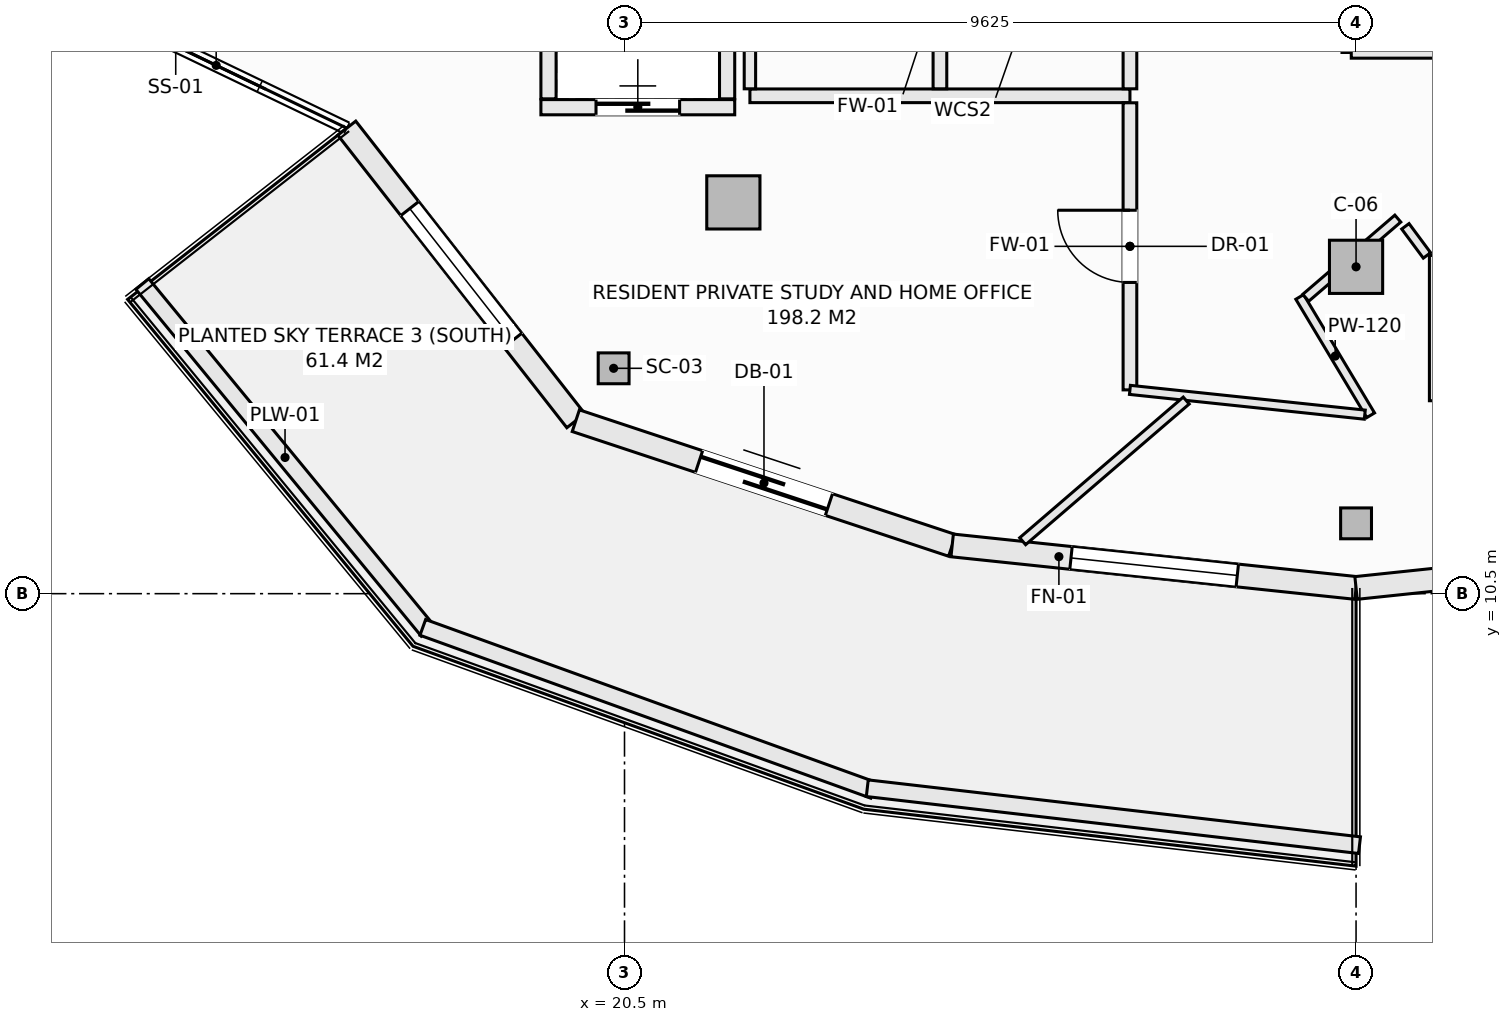
"""IFC4 building model, lengths in metres.
Left out: names, types, materials, properties, quantities, classifications, styles, units other than length and angle.
Written with IfcOpenShell. Run it as: python <this file> out.ifc"""

import sys

from ifc_helpers import new_model, si_unit, direction, frame, frame_2d, origin, origin_2d, place, context, subcontext, project, spatial, rectangle, hollow_rectangle, extrude, element, fill, save


model = new_model("IFC4")
c1 = context("Model", 3, precision=1e-05, world=origin(), true_north=direction((0.0, 1.0)))
c2 = subcontext(c1, "Body", "Model", "MODEL_VIEW")
j1 = project(units=[si_unit("LENGTHUNIT", "METRE"), si_unit("PLANEANGLEUNIT", "RADIAN")], contexts=[c1])
p1 = place(None, origin())
s1 = spatial("IfcSite", under=j1, at=p1, CompositionType="ELEMENT")
p2 = place(p1, origin())
s2 = spatial("IfcBuilding", under=s1, at=p2, CompositionType="ELEMENT")
p3 = place(p2, frame((0.0, 0.0, 259.1)))
s3 = spatial("IfcBuildingStorey", under=s2, at=p3, CompositionType="ELEMENT", Elevation=259.1)
for number, where, z_axis, x_axis in (
    (1, (20.357, 13.465, -0.27), (0.0, 0.0, 1.0), (1.0, 0.0, 0.0)),
    (2, (30.125, 11.425, -0.27), (0.0, 0.0, 1.0), (1.0, 0.0, 0.0)),
):
    element("IfcColumn", number, at=place(p3, frame(where, z_axis=z_axis, x_axis=x_axis)), inside=s3, PredefinedType="COLUMN", context=c2, shape_type="SweptSolid", body=[
        extrude(hollow_rectangle(XDim=0.406, YDim=0.406, WallThickness=0.016, at=origin_2d()), origin(), (0.0, 0.0, 1.0), 3.3),
    ])
for number, where, z_axis, x_axis in (
    (3, (21.932, 15.648, -0.27), (0.0, 0.0, 1.0), (1.0, 0.0, 0.0)),
    (4, (30.125, 14.8, -0.27), (0.0, 0.0, 1.0), (1.0, 0.0, 0.0)),
):
    element("IfcColumn", number, at=place(p3, frame(where, z_axis=z_axis, x_axis=x_axis)), inside=s3, PredefinedType="COLUMN", context=c2, shape_type="SweptSolid", body=[
        extrude(rectangle(XDim=0.7, YDim=0.7, at=origin_2d()), origin(), (0.0, 0.0, 1.0), 3.3),
    ])
p4 = place(p3, frame((16.846, 16.625, 0.0), z_axis=(0.0, 0.0, 1.0), x_axis=(0.616413297421, -0.78742278781, 0.0)))
e5 = element("IfcWall", 5, at=p4, inside=s3, PredefinedType="SOLIDWALL", context=c2, shape_type="SweptSolid", body=[
    extrude(rectangle(XDim=4.888, YDim=0.3, at=frame_2d((2.444, 0.0))), origin(), (0.0, 0.0, 1.0), 2.605),
])
p5 = place(p4, frame((1.344, 0.0, 0.72)))
e6 = element("IfcOpeningElement", 6, at=p5, cuts=e5, PredefinedType="OPENING", context=c2, shape_type="SweptSolid", body=[
    extrude(rectangle(XDim=2.2, YDim=1.65, at=frame_2d((1.1, 0.825))), frame((0.0, 0.16, 0.0), z_axis=(0.0, -1.0, 0.0), x_axis=(1.0, 0.0, 0.0)), (0.0, 0.0, 1.0), 0.32),
])
p6 = place(p3, frame((19.859, 12.775, 0.0), z_axis=(0.0, 0.0, 1.0), x_axis=(0.949252744709, -0.314514271001, 0.0)))
e7 = element("IfcWall", 7, at=p6, inside=s3, PredefinedType="SOLIDWALL", context=c2, shape_type="SweptSolid", body=[
    extrude(rectangle(XDim=5.216, YDim=0.3, at=frame_2d((2.608, 0.0))), origin(), (0.0, 0.0, 1.0), 2.605),
])
p7 = place(p6, frame((1.708, 0.0, 0.0)))
e8 = element("IfcOpeningElement", 8, at=p7, cuts=e7, PredefinedType="OPENING", context=c2, shape_type="SweptSolid", body=[
    extrude(rectangle(XDim=1.8, YDim=2.25, at=frame_2d((0.9, 1.125))), frame((0.0, 0.16, 0.0), z_axis=(0.0, -1.0, 0.0), x_axis=(1.0, 0.0, 0.0)), (0.0, 0.0, 1.0), 0.32),
])
p8 = place(p3, frame((24.811, 11.135, 0.0), z_axis=(0.0, 0.0, 1.0), x_axis=(0.9944966869, -0.104768028258, 0.0)))
e9 = element("IfcWall", 9, at=p8, inside=s3, PredefinedType="SOLIDWALL", context=c2, shape_type="SweptSolid", body=[
    extrude(rectangle(XDim=5.343, YDim=0.3, at=frame_2d((2.672, 0.0))), origin(), (0.0, 0.0, 1.0), 2.605),
])
p9 = place(p8, frame((1.572, 0.0, 0.72)))
e10 = element("IfcOpeningElement", 10, at=p9, cuts=e9, PredefinedType="OPENING", context=c2, shape_type="SweptSolid", body=[
    extrude(rectangle(XDim=2.2, YDim=1.65, at=frame_2d((1.1, 0.825))), frame((0.0, 0.16, 0.0), z_axis=(0.0, -1.0, 0.0), x_axis=(1.0, 0.0, 0.0)), (0.0, 0.0, 1.0), 0.32),
])
p10 = place(p3, frame((30.125, 10.575, 0.0), z_axis=(0.0, 0.0, 1.0), x_axis=(0.9944966869, 0.104768028258, 0.0)))
e11 = element("IfcWall", 11, at=p10, inside=s3, PredefinedType="SOLIDWALL", context=c2, shape_type="SweptSolid", body=[
    extrude(rectangle(XDim=5.343, YDim=0.3, at=frame_2d((2.672, 0.0))), origin(), (0.0, 0.0, 1.0), 2.605),
])
p11 = place(p10, frame((1.572, 0.0, 0.72)))
e12 = element("IfcOpeningElement", 12, at=p11, cuts=e11, PredefinedType="OPENING", context=c2, shape_type="SweptSolid", body=[
    extrude(rectangle(XDim=2.2, YDim=1.65, at=frame_2d((1.1, 0.825))), frame((0.0, 0.16, 0.0), z_axis=(0.0, -1.0, 0.0), x_axis=(1.0, 0.0, 0.0)), (0.0, 0.0, 1.0), 0.32),
])
p12 = place(p3, frame((14.156, 14.573, 0.0), z_axis=(0.0, 0.0, 1.0), x_axis=(0.635450933862, -0.772141250455, 0.0)))
e13 = element("IfcWall", 13, at=p12, inside=s3, PredefinedType="PARAPET", context=c2, shape_type="SweptSolid", body=[
    extrude(rectangle(XDim=5.91, YDim=0.22, at=frame_2d((2.955, 0.0))), origin(), (0.0, 0.0, 1.0), 0.52),
])
p13 = place(p3, frame((17.846, 10.056, 0.0), z_axis=(0.0, 0.0, 1.0), x_axis=(0.940465240036, -0.339889882585, 0.0)))
e14 = element("IfcWall", 14, at=p13, inside=s3, PredefinedType="PARAPET", context=c2, shape_type="SweptSolid", body=[
    extrude(rectangle(XDim=6.307, YDim=0.22, at=frame_2d((3.153, 0.0))), origin(), (0.0, 0.0, 1.0), 0.52),
])
p14 = place(p3, frame((23.694, 7.94, 0.0), z_axis=(0.0, 0.0, 1.0), x_axis=(0.993378231371, -0.114889901378, 0.0)))
e15 = element("IfcWall", 15, at=p14, inside=s3, PredefinedType="PARAPET", context=c2, shape_type="SweptSolid", body=[
    extrude(rectangle(XDim=6.52, YDim=0.22, at=frame_2d((3.26, 0.0))), origin(), (0.0, 0.0, 1.0), 0.52),
])
p15 = place(p3, frame((19.4, 16.9, 0.0), z_axis=(0.0, 0.0, 1.0), x_axis=(1.0, 0.0, 0.0)))
e16 = element("IfcWall", 16, at=p15, inside=s3, PredefinedType="SOLIDWALL", context=c2, shape_type="SweptSolid", body=[
    extrude(rectangle(XDim=2.55, YDim=0.2, at=frame_2d((1.275, 0.0))), origin(), (0.0, 0.0, 1.0), 3.03),
])
p16 = place(p15, frame((0.725, 0.0, 0.0)))
e17 = element("IfcOpeningElement", 17, at=p16, cuts=e16, PredefinedType="OPENING", context=c2, shape_type="SweptSolid", body=[
    extrude(rectangle(XDim=1.1, YDim=2.2, at=frame_2d((0.55, 1.1))), frame((0.0, 0.11, 0.0), z_axis=(0.0, -1.0, 0.0), x_axis=(1.0, 0.0, 0.0)), (0.0, 0.0, 1.0), 0.22),
])
for number, where, z_axis, x_axis in (
    (18, (19.5, 17.01, 0.0), (0.0, 0.0, 1.0), (0.0, 1.0, 0.0)),
    (19, (21.85, 17.01, 0.0), (0.0, 0.0, 1.0), (0.0, 1.0, 0.0)),
):
    element("IfcWall", number, at=place(p3, frame(where, z_axis=z_axis, x_axis=x_axis)), inside=s3, PredefinedType="SOLIDWALL", context=c2, shape_type="SweptSolid", body=[
        extrude(rectangle(XDim=2.53, YDim=0.2, at=frame_2d((1.265, 0.0))), origin(), (0.0, 0.0, 1.0), 3.03),
    ])
p17 = place(p3, frame((22.15, 17.05, 0.0), z_axis=(0.0, 0.0, 1.0), x_axis=(1.0, 0.0, 0.0)))
e20 = element("IfcWall", 20, at=p17, inside=s3, PredefinedType="SOLIDWALL", context=c2, shape_type="SweptSolid", body=[
    extrude(rectangle(XDim=5.0, YDim=0.18, at=frame_2d((2.5, 0.0))), origin(), (0.0, 0.0, 1.0), 3.03),
])
p18 = place(p3, frame((22.15, 17.142, 0.0), z_axis=(0.0, 0.0, 1.0), x_axis=(0.0, 1.0, 0.0)))
e21 = element("IfcWall", 21, at=p18, inside=s3, PredefinedType="PARTITIONING", context=c2, shape_type="SweptSolid", body=[
    extrude(rectangle(XDim=2.808, YDim=0.15, at=frame_2d((1.404, 0.0))), origin(), (0.0, 0.0, 1.0), 3.03),
])
p19 = place(p3, frame((24.65, 17.142, 0.0), z_axis=(0.0, 0.0, 1.0), x_axis=(0.0, 1.0, 0.0)))
e22 = element("IfcWall", 22, at=p19, inside=s3, PredefinedType="SOLIDWALL", context=c2, shape_type="SweptSolid", body=[
    extrude(rectangle(XDim=2.808, YDim=0.18, at=frame_2d((1.404, 0.0))), origin(), (0.0, 0.0, 1.0), 3.03),
])
p20 = place(p19, frame((0.929, 0.0, 0.0)))
e23 = element("IfcOpeningElement", 23, at=p20, cuts=e22, PredefinedType="OPENING", context=c2, shape_type="SweptSolid", body=[
    extrude(rectangle(XDim=0.95, YDim=2.1, at=frame_2d((0.475, 1.05))), frame((0.0, 0.1, 0.0), z_axis=(0.0, -1.0, 0.0), x_axis=(1.0, 0.0, 0.0)), (0.0, 0.0, 1.0), 0.2),
])
p21 = place(p3, frame((27.15, 13.181, 0.0), z_axis=(0.0, 0.0, 1.0), x_axis=(0.0, 1.0, 0.0)))
e24 = element("IfcWall", 24, at=p21, inside=s3, PredefinedType="SOLIDWALL", context=c2, shape_type="SweptSolid", body=[
    extrude(rectangle(XDim=3.777, YDim=0.18, at=frame_2d((1.889, 0.0))), origin(), (0.0, 0.0, 1.0), 3.03),
])
p22 = place(p21, frame((1.414, 0.0, 0.0)))
e25 = element("IfcOpeningElement", 25, at=p22, cuts=e24, PredefinedType="OPENING", context=c2, shape_type="SweptSolid", body=[
    extrude(rectangle(XDim=0.95, YDim=2.1, at=frame_2d((0.475, 1.05))), frame((0.0, 0.1, 0.0), z_axis=(0.0, -1.0, 0.0), x_axis=(1.0, 0.0, 0.0)), (0.0, 0.0, 1.0), 0.2),
])
p23 = place(p3, frame((27.15, 17.142, 0.0), z_axis=(0.0, 0.0, 1.0), x_axis=(0.0, 1.0, 0.0)))
e26 = element("IfcWall", 26, at=p23, inside=s3, PredefinedType="SOLIDWALL", context=c2, shape_type="SweptSolid", body=[
    extrude(rectangle(XDim=2.856, YDim=0.18, at=frame_2d((1.428, 0.0))), origin(), (0.0, 0.0, 1.0), 3.03),
])
p24 = place(p23, frame((0.953, 0.0, 0.0)))
e27 = element("IfcOpeningElement", 27, at=p24, cuts=e26, PredefinedType="OPENING", context=c2, shape_type="SweptSolid", body=[
    extrude(rectangle(XDim=0.95, YDim=2.1, at=frame_2d((0.475, 1.05))), frame((0.0, 0.1, 0.0), z_axis=(0.0, -1.0, 0.0), x_axis=(1.0, 0.0, 0.0)), (0.0, 0.0, 1.0), 0.2),
])
p25 = place(p3, frame((30.0, 17.62, 0.0), z_axis=(0.0, 0.0, 1.0), x_axis=(0.0, 1.0, 0.0)))
e28 = element("IfcWall", 28, at=p25, inside=s3, PredefinedType="PARTITIONING", context=c2, shape_type="SweptSolid", body=[
    extrude(rectangle(XDim=2.18, YDim=0.12, at=frame_2d((1.09, 0.0))), origin(), (0.0, 0.0, 1.0), 3.03),
])
p26 = place(p3, frame((30.062, 17.62, 0.0), z_axis=(0.0, 0.0, 1.0), x_axis=(1.0, 0.0, 0.0)))
e29 = element("IfcWall", 29, at=p26, inside=s3, PredefinedType="PARTITIONING", context=c2, shape_type="SweptSolid", body=[
    extrude(rectangle(XDim=4.261, YDim=0.15, at=frame_2d((2.13, 0.0))), origin(), (0.0, 0.0, 1.0), 3.03),
])
p27 = place(p26, frame((1.656, 0.0, 0.0)))
e30 = element("IfcOpeningElement", 30, at=p27, cuts=e29, PredefinedType="OPENING", context=c2, shape_type="SweptSolid", body=[
    extrude(rectangle(XDim=0.95, YDim=2.1, at=frame_2d((0.475, 1.05))), frame((0.0, 0.085, 0.0), z_axis=(0.0, -1.0, 0.0), x_axis=(1.0, 0.0, 0.0)), (0.0, 0.0, 1.0), 0.17),
])
p28 = place(p3, frame((31.15, 13.038, 0.0), z_axis=(0.0, 0.0, 1.0), x_axis=(0.0, 1.0, 0.0)))
e31 = element("IfcWall", 31, at=p28, inside=s3, PredefinedType="PARTITIONING", context=c2, shape_type="SweptSolid", body=[
    extrude(rectangle(XDim=1.912, YDim=0.12, at=frame_2d((0.956, 0.0))), origin(), (0.0, 0.0, 1.0), 3.03),
])
p29 = place(p3, frame((30.774, 15.333, 0.0), z_axis=(0.0, 0.0, 1.0), x_axis=(0.595814974861, -0.803121731577, 0.0)))
e32 = element("IfcWall", 32, at=p29, inside=s3, PredefinedType="PARTITIONING", context=c2, shape_type="SweptSolid", body=[
    extrude(rectangle(XDim=0.477, YDim=0.12, at=frame_2d((0.239, 0.0))), origin(), (0.0, 0.0, 1.0), 3.03),
])
p30 = place(p3, frame((29.384, 14.404, 0.0), z_axis=(0.0, 0.0, 1.0), x_axis=(0.513922040123, -0.857836893982, 0.0)))
e33 = element("IfcWall", 33, at=p30, inside=s3, PredefinedType="PARTITIONING", context=c2, shape_type="SweptSolid", body=[
    extrude(rectangle(XDim=1.815, YDim=0.12, at=frame_2d((0.908, 0.0))), origin(), (0.0, 0.0, 1.0), 2.77),
])
p31 = place(p3, frame((27.15, 13.181, 0.0), z_axis=(0.0, 0.0, 1.0), x_axis=(0.994482609393, -0.104901571076, 0.0)))
e34 = element("IfcWall", 34, at=p31, inside=s3, PredefinedType="PARTITIONING", context=c2, shape_type="SweptSolid", body=[
    extrude(rectangle(XDim=3.107, YDim=0.12, at=frame_2d((1.553, 0.0))), origin(), (0.0, 0.0, 1.0), 3.03),
])
p32 = place(p3, frame((25.739, 11.19, 0.0), z_axis=(0.0, 0.0, 1.0), x_axis=(0.75818689734, 0.652037290883, 0.0)))
e35 = element("IfcWall", 35, at=p32, inside=s3, PredefinedType="PARTITIONING", context=c2, shape_type="SweptSolid", body=[
    extrude(rectangle(XDim=2.838, YDim=0.12, at=frame_2d((1.419, 0.0))), origin(), (0.0, 0.0, 1.0), 3.03),
])
p33 = place(p3, frame((29.463, 14.393, 0.0), z_axis=(0.0, 0.0, 1.0), x_axis=(0.758209368839, 0.652011160184, 0.0)))
e36 = element("IfcWall", 36, at=p33, inside=s3, PredefinedType="PARTITIONING", context=c2, shape_type="SweptSolid", body=[
    extrude(rectangle(XDim=1.598, YDim=0.12, at=frame_2d((0.799, 0.0))), origin(), (0.0, 0.0, 1.0), 3.03),
])
p34 = place(p5, origin())
e37 = element("IfcWindow", 37, at=p34, inside=s3, PartitioningType="SINGLE_PANEL", PredefinedType="WINDOW", context=c2, shape_type="SweptSolid", body=[
    extrude(rectangle(XDim=2.2, YDim=1.65, at=frame_2d((1.1, 0.825))), frame((0.0, 0.03, 0.0), z_axis=(0.0, -1.0, 0.0), x_axis=(1.0, 0.0, 0.0)), (0.0, 0.0, 1.0), 0.06),
])
fill(e6, e37)
p35 = place(p7, frame((1.8, 0.0, 0.0), z_axis=(0.0, 0.0, 1.0), x_axis=(-1.0, 0.0, 0.0)))
e38 = element("IfcDoor", 38, at=p35, inside=s3, OperationType="SLIDING_TO_LEFT", PredefinedType="DOOR", context=c2, shape_type="SweptSolid", body=[
    extrude(rectangle(XDim=1.8, YDim=2.25, at=frame_2d((0.9, 1.125))), frame((0.0, 0.025, 0.0), z_axis=(0.0, -1.0, 0.0), x_axis=(1.0, 0.0, 0.0)), (0.0, 0.0, 1.0), 0.05),
])
fill(e8, e38)
p36 = place(p9, origin())
e39 = element("IfcWindow", 39, at=p36, inside=s3, PartitioningType="SINGLE_PANEL", PredefinedType="WINDOW", context=c2, shape_type="SweptSolid", body=[
    extrude(rectangle(XDim=2.2, YDim=1.65, at=frame_2d((1.1, 0.825))), frame((0.0, 0.03, 0.0), z_axis=(0.0, -1.0, 0.0), x_axis=(1.0, 0.0, 0.0)), (0.0, 0.0, 1.0), 0.06),
])
fill(e10, e39)
p37 = place(p16, origin())
e40 = element("IfcDoor", 40, at=p37, inside=s3, OperationType="SLIDING_TO_LEFT", PredefinedType="DOOR", context=c2, shape_type="SweptSolid", body=[
    extrude(rectangle(XDim=1.1, YDim=2.2, at=frame_2d((0.55, 1.1))), frame((0.0, 0.025, 0.0), z_axis=(0.0, -1.0, 0.0), x_axis=(1.0, 0.0, 0.0)), (0.0, 0.0, 1.0), 0.05),
])
fill(e17, e40)
p38 = place(p22, origin())
e41 = element("IfcDoor", 41, at=p38, inside=s3, OperationType="SINGLE_SWING_RIGHT", PredefinedType="DOOR", context=c2, shape_type="SweptSolid", body=[
    extrude(rectangle(XDim=0.95, YDim=2.1, at=frame_2d((0.475, 1.05))), frame((0.0, 0.025, 0.0), z_axis=(0.0, -1.0, 0.0), x_axis=(1.0, 0.0, 0.0)), (0.0, 0.0, 1.0), 0.05),
])
fill(e25, e41)
save(model, sys.argv[1])
